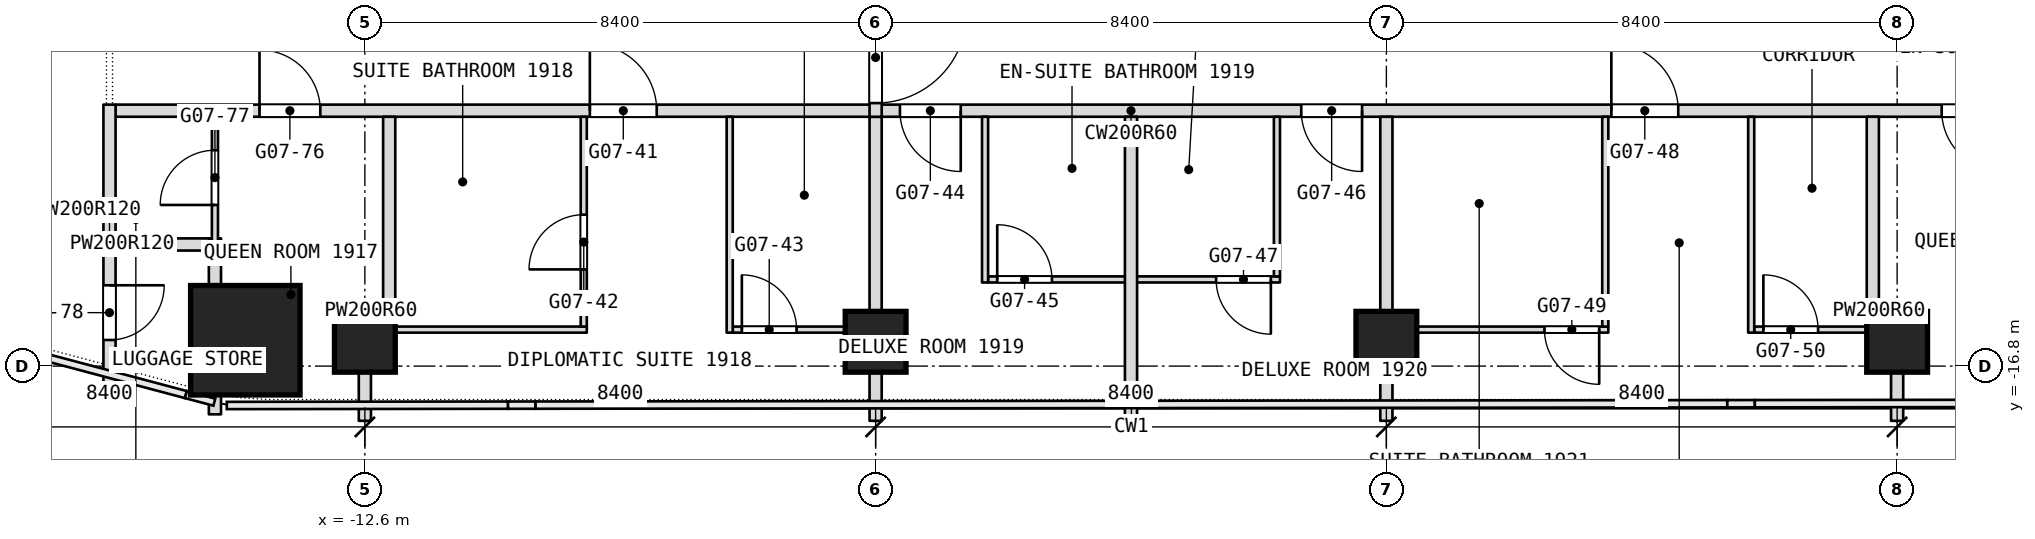
"""IFC4 building model, lengths in metres.
Left out: names, types, materials, properties, quantities, classifications, styles, units other than length and angle.
Written with IfcOpenShell. Run it as: python <this file> out.ifc"""

import sys

from ifc_helpers import new_model, si_unit, direction, frame, frame_2d, origin, origin_2d, place, context, subcontext, project, spatial, rectangle, extrude, element, fill, save


model = new_model("IFC4")
c1 = context("Model", 3, precision=1e-05, world=origin(), true_north=direction((0.0, 1.0)))
c2 = subcontext(c1, "Body", "Model", "MODEL_VIEW")
j1 = project(units=[si_unit("LENGTHUNIT", "METRE"), si_unit("PLANEANGLEUNIT", "RADIAN")], contexts=[c1])
p1 = place(None, origin())
s1 = spatial("IfcSite", under=j1, at=p1, CompositionType="ELEMENT")
p2 = place(p1, origin())
s2 = spatial("IfcBuilding", under=s1, at=p2, CompositionType="ELEMENT")
p3 = place(p2, frame((0.0, 0.0, 83.3)))
s3 = spatial("IfcBuildingStorey", under=s2, at=p3, CompositionType="ELEMENT", Elevation=83.3)
p4 = place(p3, frame((-14.566, -16.375, 0.0), z_axis=(0.0, 0.0, 1.0), x_axis=(1.0, 0.0, 0.0)))
e1 = element("IfcColumn", 1, at=p4, inside=s3, PredefinedType="COLUMN", context=c2, shape_type="SweptSolid", body=[
    extrude(rectangle(XDim=1.8, YDim=1.8, at=origin_2d()), origin(), (0.0, 0.0, 1.0), 3.6),
])
for number, where, z_axis, x_axis in (
    (2, (12.6, -16.4, 0.0), (0.0, 0.0, 1.0), (1.0, 0.0, 0.0)),
    (3, (4.2, -16.4, 0.0), (0.0, 0.0, 1.0), (1.0, 0.0, 0.0)),
    (4, (-4.2, -16.4, 0.0), (0.0, 0.0, 1.0), (1.0, 0.0, 0.0)),
    (5, (-12.6, -16.4, 0.0), (0.0, 0.0, 1.0), (1.0, 0.0, 0.0)),
):
    element("IfcColumn", number, at=place(p3, frame(where, z_axis=z_axis, x_axis=x_axis)), inside=s3, PredefinedType="COLUMN", context=c2, shape_type="SweptSolid", body=[
        extrude(rectangle(XDim=1.0, YDim=1.0, at=origin_2d()), origin(), (0.0, 0.0, 1.0), 3.6),
    ])
p5 = place(p3, frame((-12.5, -16.2, 0.0), z_axis=(0.0, 0.0, 1.0), x_axis=(1.0, 0.0, 0.0)))
e6 = element("IfcWall", 6, at=p5, inside=s3, PredefinedType="PARTITIONING", context=c2, shape_type="SweptSolid", body=[
    extrude(rectangle(XDim=3.55, YDim=0.1, at=frame_2d((1.775, 0.0))), origin(), (0.0, 0.0, 1.0), 2.486),
])
p6 = place(p3, frame((-6.55, -16.2, 0.0), z_axis=(0.0, 0.0, 1.0), x_axis=(1.0, 0.0, 0.0)))
e7 = element("IfcWall", 7, at=p6, inside=s3, PredefinedType="PARTITIONING", context=c2, shape_type="SweptSolid", body=[
    extrude(rectangle(XDim=2.45, YDim=0.1, at=frame_2d((1.225, 0.0))), origin(), (0.0, 0.0, 1.0), 2.486),
])
p7 = place(p6, frame((0.15, 0.0, 0.0)))
e8 = element("IfcOpeningElement", 8, at=p7, cuts=e7, PredefinedType="OPENING", context=c2, shape_type="SweptSolid", body=[
    extrude(rectangle(XDim=0.9, YDim=2.1, at=frame_2d((0.45, 1.05))), frame((0.0, 0.05, 0.0), z_axis=(0.0, -1.0, 0.0), x_axis=(1.0, 0.0, 0.0)), (0.0, 0.0, 1.0), 0.1),
])
p8 = place(p3, frame((4.3, -16.2, 0.0), z_axis=(0.0, 0.0, 1.0), x_axis=(1.0, 0.0, 0.0)))
e9 = element("IfcWall", 9, at=p8, inside=s3, PredefinedType="PARTITIONING", context=c2, shape_type="SweptSolid", body=[
    extrude(rectangle(XDim=3.55, YDim=0.1, at=frame_2d((1.775, 0.0))), origin(), (0.0, 0.0, 1.0), 2.486),
])
p9 = place(p8, frame((2.5, 0.0, 0.0)))
e10 = element("IfcOpeningElement", 10, at=p9, cuts=e9, PredefinedType="OPENING", context=c2, shape_type="SweptSolid", body=[
    extrude(rectangle(XDim=0.9, YDim=2.1, at=frame_2d((0.45, 1.05))), frame((0.0, 0.05, 0.0), z_axis=(0.0, -1.0, 0.0), x_axis=(1.0, 0.0, 0.0)), (0.0, 0.0, 1.0), 0.1),
])
p10 = place(p3, frame((10.25, -16.2, 0.0), z_axis=(0.0, 0.0, 1.0), x_axis=(1.0, 0.0, 0.0)))
e11 = element("IfcWall", 11, at=p10, inside=s3, PredefinedType="PARTITIONING", context=c2, shape_type="SweptSolid", body=[
    extrude(rectangle(XDim=2.45, YDim=0.1, at=frame_2d((1.225, 0.0))), origin(), (0.0, 0.0, 1.0), 3.3),
])
p11 = place(p10, frame((0.15, 0.0, 0.0)))
e12 = element("IfcOpeningElement", 12, at=p11, cuts=e11, PredefinedType="OPENING", context=c2, shape_type="SweptSolid", body=[
    extrude(rectangle(XDim=0.9, YDim=2.1, at=frame_2d((0.45, 1.05))), frame((0.0, 0.05, 0.0), z_axis=(0.0, -1.0, 0.0), x_axis=(1.0, 0.0, 0.0)), (0.0, 0.0, 1.0), 0.1),
])
for number, where, z_axis, x_axis in (
    (13, (-12.7, -15.9, 0.0), (0.0, 0.0, 1.0), (1.0, 0.0, 0.0)),
    (14, (12.1, -15.9, 0.0), (0.0, 0.0, 1.0), (1.0, 0.0, 0.0)),
):
    element("IfcWall", number, at=place(p3, frame(where, z_axis=z_axis, x_axis=x_axis)), inside=s3, PredefinedType="PARTITIONING", context=c2, shape_type="SweptSolid", body=[
        extrude(rectangle(XDim=0.4, YDim=0.2, at=frame_2d((0.2, 0.0))), origin(), (0.0, 0.0, 1.0), 3.3),
    ])
p12 = place(p3, frame((-2.35, -15.375, 0.0), z_axis=(0.0, 0.0, 1.0), x_axis=(1.0, 0.0, 0.0)))
e15 = element("IfcWall", 15, at=p12, inside=s3, PredefinedType="PARTITIONING", context=c2, shape_type="SweptSolid", body=[
    extrude(rectangle(XDim=4.8, YDim=0.1, at=frame_2d((2.4, 0.0))), origin(), (0.0, 0.0, 1.0), 3.3),
])
p13 = place(p12, frame((0.15, 0.0, 0.0)))
e16 = element("IfcOpeningElement", 16, at=p13, cuts=e15, PredefinedType="OPENING", context=c2, shape_type="SweptSolid", body=[
    extrude(rectangle(XDim=0.9, YDim=2.1, at=frame_2d((0.45, 1.05))), frame((0.0, 0.05, 0.0), z_axis=(0.0, -1.0, 0.0), x_axis=(1.0, 0.0, 0.0)), (0.0, 0.0, 1.0), 0.1),
])
p14 = place(p12, frame((3.75, 0.0, 0.0)))
e17 = element("IfcOpeningElement", 17, at=p14, cuts=e15, PredefinedType="OPENING", context=c2, shape_type="SweptSolid", body=[
    extrude(rectangle(XDim=0.9, YDim=2.1, at=frame_2d((0.45, 1.05))), frame((0.0, 0.05, 0.0), z_axis=(0.0, -1.0, 0.0), x_axis=(1.0, 0.0, 0.0)), (0.0, 0.0, 1.0), 0.1),
])
p15 = place(p3, frame((-16.7, -14.8, 0.0), z_axis=(0.0, 0.0, 1.0), x_axis=(1.0, 0.0, 0.0)))
e18 = element("IfcWall", 18, at=p15, inside=s3, PredefinedType="PARTITIONING", context=c2, shape_type="SweptSolid", body=[
    extrude(rectangle(XDim=1.584, YDim=0.2, at=frame_2d((0.792, 0.0))), origin(), (0.0, 0.0, 1.0), 3.3),
])
p16 = place(p3, frame((12.6, -17.7, 0.0), z_axis=(0.0, 0.0, 1.0), x_axis=(0.0, 1.0, 0.0)))
e19 = element("IfcWall", 19, at=p16, inside=s3, PredefinedType="PARTITIONING", context=c2, shape_type="SweptSolid", body=[
    extrude(rectangle(XDim=1.9, YDim=0.2, at=frame_2d((0.95, 0.0))), origin(), (0.0, 0.0, 1.0), 2.742),
])
p17 = place(p3, frame((-16.7, -12.6, 0.0), z_axis=(0.0, 0.0, 1.0), x_axis=(1.0, 0.0, 0.0)))
e20 = element("IfcWall", 20, at=p17, inside=s3, PredefinedType="PARTITIONING", context=c2, shape_type="SweptSolid", body=[
    extrude(rectangle(XDim=33.4, YDim=0.2, at=frame_2d((16.7, 0.0))), origin(), (0.0, 0.0, 1.0), 3.3),
])
p18 = place(p17, frame((7.8, 0.0, 0.0)))
e21 = element("IfcOpeningElement", 21, at=p18, cuts=e20, PredefinedType="OPENING", context=c2, shape_type="SweptSolid", body=[
    extrude(rectangle(XDim=1.1, YDim=2.1, at=frame_2d((0.55, 1.05))), frame((0.0, 0.1, 0.0), z_axis=(0.0, -1.0, 0.0), x_axis=(1.0, 0.0, 0.0)), (0.0, 0.0, 1.0), 0.2),
])
p19 = place(p17, frame((12.9, 0.0, 0.0)))
e22 = element("IfcOpeningElement", 22, at=p19, cuts=e20, PredefinedType="OPENING", context=c2, shape_type="SweptSolid", body=[
    extrude(rectangle(XDim=1.0, YDim=2.1, at=frame_2d((0.5, 1.05))), frame((0.0, 0.1, 0.0), z_axis=(0.0, -1.0, 0.0), x_axis=(1.0, 0.0, 0.0)), (0.0, 0.0, 1.0), 0.2),
])
p20 = place(p17, frame((19.5, 0.0, 0.0)))
e23 = element("IfcOpeningElement", 23, at=p20, cuts=e20, PredefinedType="OPENING", context=c2, shape_type="SweptSolid", body=[
    extrude(rectangle(XDim=1.0, YDim=2.1, at=frame_2d((0.5, 1.05))), frame((0.0, 0.1, 0.0), z_axis=(0.0, -1.0, 0.0), x_axis=(1.0, 0.0, 0.0)), (0.0, 0.0, 1.0), 0.2),
])
p21 = place(p17, frame((24.6, 0.0, 0.0)))
e24 = element("IfcOpeningElement", 24, at=p21, cuts=e20, PredefinedType="OPENING", context=c2, shape_type="SweptSolid", body=[
    extrude(rectangle(XDim=1.1, YDim=2.1, at=frame_2d((0.55, 1.05))), frame((0.0, 0.1, 0.0), z_axis=(0.0, -1.0, 0.0), x_axis=(1.0, 0.0, 0.0)), (0.0, 0.0, 1.0), 0.2),
])
p22 = place(p17, frame((2.367, 0.0, 0.0)))
e25 = element("IfcOpeningElement", 25, at=p22, cuts=e20, PredefinedType="OPENING", context=c2, shape_type="SweptSolid", body=[
    extrude(rectangle(XDim=1.0, YDim=2.1, at=frame_2d((0.5, 1.05))), frame((0.0, 0.1, 0.0), z_axis=(0.0, -1.0, 0.0), x_axis=(1.0, 0.0, 0.0)), (0.0, 0.0, 1.0), 0.2),
])
p23 = place(p17, frame((30.033, 0.0, 0.0)))
e26 = element("IfcOpeningElement", 26, at=p23, cuts=e20, PredefinedType="OPENING", context=c2, shape_type="SweptSolid", body=[
    extrude(rectangle(XDim=1.0, YDim=2.1, at=frame_2d((0.5, 1.05))), frame((0.0, 0.1, 0.0), z_axis=(0.0, -1.0, 0.0), x_axis=(1.0, 0.0, 0.0)), (0.0, 0.0, 1.0), 0.2),
])
p24 = place(p3, frame((12.2, -15.8, 0.0), z_axis=(0.0, 0.0, 1.0), x_axis=(0.0, 1.0, 0.0)))
e27 = element("IfcWall", 27, at=p24, inside=s3, PredefinedType="PARTITIONING", context=c2, shape_type="SweptSolid", body=[
    extrude(rectangle(XDim=3.1, YDim=0.2, at=frame_2d((1.55, 0.0))), origin(), (0.0, 0.0, 1.0), 3.3),
])
p25 = place(p3, frame((10.2, -16.25, 0.0), z_axis=(0.0, 0.0, 1.0), x_axis=(0.0, 1.0, 0.0)))
e28 = element("IfcWall", 28, at=p25, inside=s3, PredefinedType="PARTITIONING", context=c2, shape_type="SweptSolid", body=[
    extrude(rectangle(XDim=3.55, YDim=0.1, at=frame_2d((1.775, 0.0))), origin(), (0.0, 0.0, 1.0), 3.3),
])
p26 = place(p3, frame((7.8, -16.15, 0.0), z_axis=(0.0, 0.0, 1.0), x_axis=(0.0, 1.0, 0.0)))
e29 = element("IfcWall", 29, at=p26, inside=s3, PredefinedType="PARTITIONING", context=c2, shape_type="SweptSolid", body=[
    extrude(rectangle(XDim=3.45, YDim=0.1, at=frame_2d((1.725, 0.0))), origin(), (0.0, 0.0, 1.0), 3.3),
])
p27 = place(p3, frame((4.2, -17.7, 0.0), z_axis=(0.0, 0.0, 1.0), x_axis=(0.0, 1.0, 0.0)))
e30 = element("IfcWall", 30, at=p27, inside=s3, PredefinedType="PARTITIONING", context=c2, shape_type="SweptSolid", body=[
    extrude(rectangle(XDim=5.0, YDim=0.2, at=frame_2d((2.5, 0.0))), origin(), (0.0, 0.0, 1.0), 2.486),
])
p28 = place(p3, frame((2.4, -15.325, 0.0), z_axis=(0.0, 0.0, 1.0), x_axis=(0.0, 1.0, 0.0)))
e31 = element("IfcWall", 31, at=p28, inside=s3, PredefinedType="PARTITIONING", context=c2, shape_type="SweptSolid", body=[
    extrude(rectangle(XDim=2.625, YDim=0.1, at=frame_2d((1.312, 0.0))), origin(), (0.0, 0.0, 1.0), 3.3),
])
p29 = place(p3, frame((0.0, -17.7, 0.0), z_axis=(0.0, 0.0, 1.0), x_axis=(0.0, 1.0, 0.0)))
e32 = element("IfcWall", 32, at=p29, inside=s3, PredefinedType="PARTITIONING", context=c2, shape_type="SweptSolid", body=[
    extrude(rectangle(XDim=5.0, YDim=0.2, at=frame_2d((2.5, 0.0))), origin(), (0.0, 0.0, 1.0), 3.3),
])
p30 = place(p3, frame((-2.4, -15.425, 0.0), z_axis=(0.0, 0.0, 1.0), x_axis=(0.0, 1.0, 0.0)))
e33 = element("IfcWall", 33, at=p30, inside=s3, PredefinedType="PARTITIONING", context=c2, shape_type="SweptSolid", body=[
    extrude(rectangle(XDim=2.725, YDim=0.1, at=frame_2d((1.363, 0.0))), origin(), (0.0, 0.0, 1.0), 3.3),
])
p31 = place(p3, frame((-4.2, -17.7, 0.0), z_axis=(0.0, 0.0, 1.0), x_axis=(0.0, 1.0, 0.0)))
e34 = element("IfcWall", 34, at=p31, inside=s3, PredefinedType="PARTITIONING", context=c2, shape_type="SweptSolid", body=[
    extrude(rectangle(XDim=5.0, YDim=0.2, at=frame_2d((2.5, 0.0))), origin(), (0.0, 0.0, 1.0), 2.486),
])
p32 = place(p3, frame((-4.2, -12.7, 0.0), z_axis=(0.0, 0.0, 1.0), x_axis=(0.0, 1.0, 0.0)))
e35 = element("IfcWall", 35, at=p32, inside=s3, PredefinedType="PARTITIONING", context=c2, shape_type="SweptSolid", body=[
    extrude(rectangle(XDim=12.7, YDim=0.2, at=frame_2d((6.35, 0.0))), origin(), (0.0, 0.0, 1.0), 2.486),
])
p33 = place(p32, frame((11.05, 0.0, 0.0)))
e36 = element("IfcOpeningElement", 36, at=p33, cuts=e35, PredefinedType="OPENING", context=c2, shape_type="SweptSolid", body=[
    extrude(rectangle(XDim=1.5, YDim=2.1, at=frame_2d((0.75, 1.05))), frame((0.0, 0.1, 0.0), z_axis=(0.0, -1.0, 0.0), x_axis=(1.0, 0.0, 0.0)), (0.0, 0.0, 1.0), 0.2),
])
p34 = place(p32, frame((0.225, 0.0, 0.0)))
e37 = element("IfcOpeningElement", 37, at=p34, cuts=e35, PredefinedType="OPENING", context=c2, shape_type="SweptSolid", body=[
    extrude(rectangle(XDim=1.5, YDim=2.1, at=frame_2d((0.75, 1.05))), frame((0.0, 0.1, 0.0), z_axis=(0.0, -1.0, 0.0), x_axis=(1.0, 0.0, 0.0)), (0.0, 0.0, 1.0), 0.2),
])
p35 = place(p3, frame((-6.6, -16.25, 0.0), z_axis=(0.0, 0.0, 1.0), x_axis=(0.0, 1.0, 0.0)))
e38 = element("IfcWall", 38, at=p35, inside=s3, PredefinedType="PARTITIONING", context=c2, shape_type="SweptSolid", body=[
    extrude(rectangle(XDim=3.55, YDim=0.1, at=frame_2d((1.775, 0.0))), origin(), (0.0, 0.0, 1.0), 3.3),
])
p36 = place(p3, frame((-9.0, -16.15, 0.0), z_axis=(0.0, 0.0, 1.0), x_axis=(0.0, 1.0, 0.0)))
e39 = element("IfcWall", 39, at=p36, inside=s3, PredefinedType="PARTITIONING", context=c2, shape_type="SweptSolid", body=[
    extrude(rectangle(XDim=3.45, YDim=0.1, at=frame_2d((1.725, 0.0))), origin(), (0.0, 0.0, 1.0), 3.3),
])
p37 = place(p36, frame((0.94, 0.0, 0.0)))
e40 = element("IfcOpeningElement", 40, at=p37, cuts=e39, PredefinedType="OPENING", context=c2, shape_type="SweptSolid", body=[
    extrude(rectangle(XDim=0.9, YDim=2.1, at=frame_2d((0.45, 1.05))), frame((0.0, 0.05, 0.0), z_axis=(0.0, -1.0, 0.0), x_axis=(1.0, 0.0, 0.0)), (0.0, 0.0, 1.0), 0.1),
])
p38 = place(p3, frame((-12.2, -16.0, 0.0), z_axis=(0.0, 0.0, 1.0), x_axis=(0.0, 1.0, 0.0)))
e41 = element("IfcWall", 41, at=p38, inside=s3, PredefinedType="PARTITIONING", context=c2, shape_type="SweptSolid", body=[
    extrude(rectangle(XDim=3.3, YDim=0.2, at=frame_2d((1.65, 0.0))), origin(), (0.0, 0.0, 1.0), 3.3),
])
p39 = place(p3, frame((-12.6, -17.7, 0.0), z_axis=(0.0, 0.0, 1.0), x_axis=(0.0, 1.0, 0.0)))
e42 = element("IfcWall", 42, at=p39, inside=s3, PredefinedType="PARTITIONING", context=c2, shape_type="SweptSolid", body=[
    extrude(rectangle(XDim=1.7, YDim=0.2, at=frame_2d((0.85, 0.0))), origin(), (0.0, 0.0, 1.0), 2.742),
])
p40 = place(p3, frame((-15.066, -17.593, 0.0), z_axis=(0.0, 0.0, 1.0), x_axis=(0.0, 1.0, 0.0)))
e43 = element("IfcWall", 43, at=p40, inside=s3, PredefinedType="PARTITIONING", context=c2, shape_type="SweptSolid", body=[
    extrude(rectangle(XDim=0.318, YDim=0.2, at=frame_2d((0.159, 0.0))), origin(), (0.0, 0.0, 1.0), 3.3),
])
p41 = place(p3, frame((-15.066, -15.475, 0.0), z_axis=(0.0, 0.0, 1.0), x_axis=(0.0, 1.0, 0.0)))
e44 = element("IfcWall", 44, at=p41, inside=s3, PredefinedType="PARTITIONING", context=c2, shape_type="SweptSolid", body=[
    extrude(rectangle(XDim=0.775, YDim=0.2, at=frame_2d((0.388, 0.0))), origin(), (0.0, 0.0, 1.0), 3.3),
])
p42 = place(p3, frame((-15.066, -14.9, 0.0), z_axis=(0.0, 0.0, 1.0), x_axis=(0.0, 1.0, 0.0)))
e45 = element("IfcWall", 45, at=p42, inside=s3, PredefinedType="PARTITIONING", context=c2, shape_type="SweptSolid", body=[
    extrude(rectangle(XDim=2.2, YDim=0.1, at=frame_2d((1.1, 0.0))), origin(), (0.0, 0.0, 1.0), 3.3),
])
p43 = place(p42, frame((0.75, 0.0, 0.0)))
e46 = element("IfcOpeningElement", 46, at=p43, cuts=e45, PredefinedType="OPENING", context=c2, shape_type="SweptSolid", body=[
    extrude(rectangle(XDim=0.9, YDim=2.1, at=frame_2d((0.45, 1.05))), frame((0.0, 0.05, 0.0), z_axis=(0.0, -1.0, 0.0), x_axis=(1.0, 0.0, 0.0)), (0.0, 0.0, 1.0), 0.1),
])
p44 = place(p3, frame((-16.8, -17.143, 0.0), z_axis=(0.0, 0.0, 1.0), x_axis=(0.0, 1.0, 0.0)))
e47 = element("IfcWall", 47, at=p44, inside=s3, PredefinedType="PARTITIONING", context=c2, shape_type="SweptSolid", body=[
    extrude(rectangle(XDim=4.643, YDim=0.2, at=frame_2d((2.322, 0.0))), origin(), (0.0, 0.0, 1.0), 3.3),
])
p45 = place(p44, frame((0.772, 0.0, 0.0)))
e48 = element("IfcOpeningElement", 48, at=p45, cuts=e47, PredefinedType="OPENING", context=c2, shape_type="SweptSolid", body=[
    extrude(rectangle(XDim=0.9, YDim=2.1, at=frame_2d((0.45, 1.05))), frame((0.0, 0.1, 0.0), z_axis=(0.0, -1.0, 0.0), x_axis=(1.0, 0.0, 0.0)), (0.0, 0.0, 1.0), 0.2),
])
p46 = place(p7, origin())
e49 = element("IfcDoor", 49, at=p46, inside=s3, OperationType="SINGLE_SWING_LEFT", PredefinedType="DOOR", context=c2, shape_type="SweptSolid", body=[
    extrude(rectangle(XDim=0.9, YDim=2.1, at=frame_2d((0.45, 1.05))), frame((0.0, 0.025, 0.0), z_axis=(0.0, -1.0, 0.0), x_axis=(1.0, 0.0, 0.0)), (0.0, 0.0, 1.0), 0.05),
])
fill(e8, e49)
p47 = place(p9, origin())
e50 = element("IfcDoor", 50, at=p47, inside=s3, OperationType="SINGLE_SWING_RIGHT", PredefinedType="DOOR", context=c2, shape_type="SweptSolid", body=[
    extrude(rectangle(XDim=0.9, YDim=2.1, at=frame_2d((0.45, 1.05))), frame((0.0, 0.025, 0.0), z_axis=(0.0, -1.0, 0.0), x_axis=(1.0, 0.0, 0.0)), (0.0, 0.0, 1.0), 0.05),
])
fill(e10, e50)
p48 = place(p11, origin())
e51 = element("IfcDoor", 51, at=p48, inside=s3, OperationType="SINGLE_SWING_LEFT", PredefinedType="DOOR", context=c2, shape_type="SweptSolid", body=[
    extrude(rectangle(XDim=0.9, YDim=2.1, at=frame_2d((0.45, 1.05))), frame((0.0, 0.025, 0.0), z_axis=(0.0, -1.0, 0.0), x_axis=(1.0, 0.0, 0.0)), (0.0, 0.0, 1.0), 0.05),
])
fill(e12, e51)
p49 = place(p13, origin())
e52 = element("IfcDoor", 52, at=p49, inside=s3, OperationType="SINGLE_SWING_LEFT", PredefinedType="DOOR", context=c2, shape_type="SweptSolid", body=[
    extrude(rectangle(XDim=0.9, YDim=2.1, at=frame_2d((0.45, 1.05))), frame((0.0, 0.025, 0.0), z_axis=(0.0, -1.0, 0.0), x_axis=(1.0, 0.0, 0.0)), (0.0, 0.0, 1.0), 0.05),
])
fill(e16, e52)
p50 = place(p14, origin())
e53 = element("IfcDoor", 53, at=p50, inside=s3, OperationType="SINGLE_SWING_RIGHT", PredefinedType="DOOR", context=c2, shape_type="SweptSolid", body=[
    extrude(rectangle(XDim=0.9, YDim=2.1, at=frame_2d((0.45, 1.05))), frame((0.0, 0.025, 0.0), z_axis=(0.0, -1.0, 0.0), x_axis=(1.0, 0.0, 0.0)), (0.0, 0.0, 1.0), 0.05),
])
fill(e17, e53)
p51 = place(p18, origin())
e54 = element("IfcDoor", 54, at=p51, inside=s3, OperationType="SINGLE_SWING_RIGHT", PredefinedType="DOOR", context=c2, shape_type="SweptSolid", body=[
    extrude(rectangle(XDim=1.1, YDim=2.1, at=frame_2d((0.55, 1.05))), frame((0.0, 0.025, 0.0), z_axis=(0.0, -1.0, 0.0), x_axis=(1.0, 0.0, 0.0)), (0.0, 0.0, 1.0), 0.05),
])
fill(e21, e54)
p52 = place(p19, origin())
e55 = element("IfcDoor", 55, at=p52, inside=s3, OperationType="SINGLE_SWING_RIGHT", PredefinedType="DOOR", context=c2, shape_type="SweptSolid", body=[
    extrude(rectangle(XDim=1.0, YDim=2.1, at=frame_2d((0.5, 1.05))), frame((0.0, 0.025, 0.0), z_axis=(0.0, -1.0, 0.0), x_axis=(1.0, 0.0, 0.0)), (0.0, 0.0, 1.0), 0.05),
])
fill(e22, e55)
p53 = place(p20, origin())
e56 = element("IfcDoor", 56, at=p53, inside=s3, OperationType="SINGLE_SWING_RIGHT", PredefinedType="DOOR", context=c2, shape_type="SweptSolid", body=[
    extrude(rectangle(XDim=1.0, YDim=2.1, at=frame_2d((0.5, 1.05))), frame((0.0, 0.025, 0.0), z_axis=(0.0, -1.0, 0.0), x_axis=(1.0, 0.0, 0.0)), (0.0, 0.0, 1.0), 0.05),
])
fill(e23, e56)
p54 = place(p21, origin())
e57 = element("IfcDoor", 57, at=p54, inside=s3, OperationType="SINGLE_SWING_RIGHT", PredefinedType="DOOR", context=c2, shape_type="SweptSolid", body=[
    extrude(rectangle(XDim=1.1, YDim=2.1, at=frame_2d((0.55, 1.05))), frame((0.0, 0.025, 0.0), z_axis=(0.0, -1.0, 0.0), x_axis=(1.0, 0.0, 0.0)), (0.0, 0.0, 1.0), 0.05),
])
fill(e24, e57)
p55 = place(p22, origin())
e58 = element("IfcDoor", 58, at=p55, inside=s3, OperationType="SINGLE_SWING_RIGHT", PredefinedType="DOOR", context=c2, shape_type="SweptSolid", body=[
    extrude(rectangle(XDim=1.0, YDim=2.1, at=frame_2d((0.5, 1.05))), frame((0.0, 0.025, 0.0), z_axis=(0.0, -1.0, 0.0), x_axis=(1.0, 0.0, 0.0)), (0.0, 0.0, 1.0), 0.05),
])
fill(e25, e58)
p56 = place(p23, origin())
e59 = element("IfcDoor", 59, at=p56, inside=s3, OperationType="SINGLE_SWING_LEFT", PredefinedType="DOOR", context=c2, shape_type="SweptSolid", body=[
    extrude(rectangle(XDim=1.0, YDim=2.1, at=frame_2d((0.5, 1.05))), frame((0.0, 0.025, 0.0), z_axis=(0.0, -1.0, 0.0), x_axis=(1.0, 0.0, 0.0)), (0.0, 0.0, 1.0), 0.05),
])
fill(e26, e59)
p57 = place(p37, origin())
e60 = element("IfcDoor", 60, at=p57, inside=s3, OperationType="SINGLE_SWING_LEFT", PredefinedType="DOOR", context=c2, shape_type="SweptSolid", body=[
    extrude(rectangle(XDim=0.9, YDim=2.1, at=frame_2d((0.45, 1.05))), frame((0.0, 0.025, 0.0), z_axis=(0.0, -1.0, 0.0), x_axis=(1.0, 0.0, 0.0)), (0.0, 0.0, 1.0), 0.05),
])
fill(e40, e60)
p58 = place(p43, origin())
e61 = element("IfcDoor", 61, at=p58, inside=s3, OperationType="SINGLE_SWING_RIGHT", PredefinedType="DOOR", context=c2, shape_type="SweptSolid", body=[
    extrude(rectangle(XDim=0.9, YDim=2.1, at=frame_2d((0.45, 1.05))), frame((0.0, 0.025, 0.0), z_axis=(0.0, -1.0, 0.0), x_axis=(1.0, 0.0, 0.0)), (0.0, 0.0, 1.0), 0.05),
])
fill(e46, e61)
p59 = place(p45, origin())
e62 = element("IfcDoor", 62, at=p59, inside=s3, OperationType="SINGLE_SWING_LEFT", PredefinedType="DOOR", context=c2, shape_type="SweptSolid", body=[
    extrude(rectangle(XDim=0.9, YDim=2.1, at=frame_2d((0.45, 1.05))), frame((0.0, 0.025, 0.0), z_axis=(0.0, -1.0, 0.0), x_axis=(1.0, 0.0, 0.0)), (0.0, 0.0, 1.0), 0.05),
])
fill(e48, e62)
p60 = place(p34, origin())
e63 = element("IfcDoor", 63, at=p60, inside=s3, OperationType="DOUBLE_DOOR_DOUBLE_SWING", PredefinedType="DOOR", context=c2, shape_type="SweptSolid", body=[
    extrude(rectangle(XDim=1.5, YDim=2.1, at=frame_2d((0.75, 1.05))), frame((0.0, 0.025, 0.0), z_axis=(0.0, -1.0, 0.0), x_axis=(1.0, 0.0, 0.0)), (0.0, 0.0, 1.0), 0.05),
])
fill(e37, e63)
save(model, sys.argv[1])
